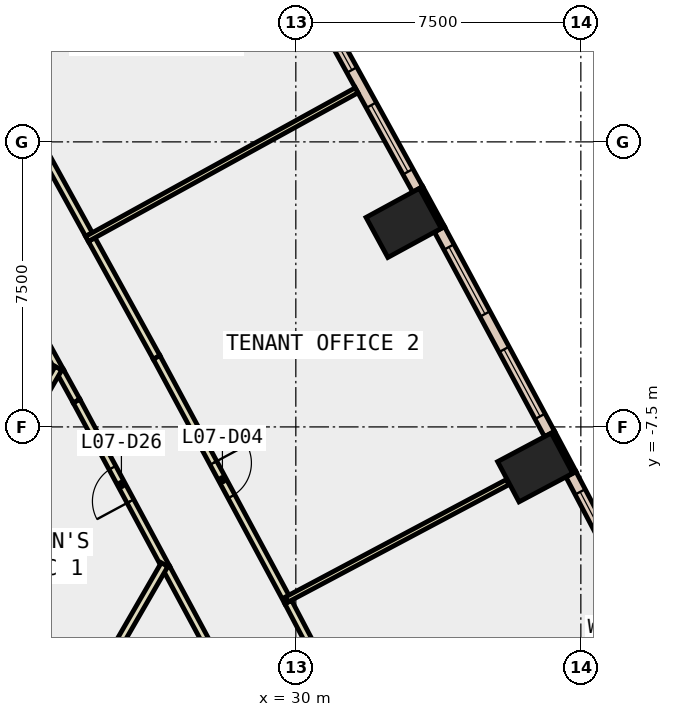
"""IFC4 building model, lengths in metres.
Left out: names, types, materials, properties, quantities, classifications, styles, units other than length and angle.
Written with IfcOpenShell. Run it as: python <this file> out.ifc"""

import sys

from ifc_helpers import new_model, si_unit, direction, frame, frame_2d, origin, origin_2d, place, context, subcontext, project, spatial, rectangle, extrude, element, fill, save


model = new_model("IFC4")
c1 = context("Model", 3, precision=1e-05, world=origin(), true_north=direction((0.0, 1.0)))
c2 = subcontext(c1, "Body", "Model", "MODEL_VIEW")
j1 = project(units=[si_unit("LENGTHUNIT", "METRE"), si_unit("PLANEANGLEUNIT", "RADIAN")], contexts=[c1])
p1 = place(None, origin())
s1 = spatial("IfcSite", under=j1, at=p1, CompositionType="ELEMENT")
p2 = place(p1, origin())
s2 = spatial("IfcBuilding", under=s1, at=p2, CompositionType="ELEMENT")
p3 = place(p2, frame((0.0, 0.0, 39.2)))
s3 = spatial("IfcBuildingStorey", under=s2, at=p3, CompositionType="ELEMENT", Elevation=39.2)
for number, where, z_axis, x_axis in (
    (1, (36.298, -8.567, -0.4), (0.0, 0.0, 1.0), (-0.469, 0.883, 0.0)),
    (2, (32.837, -2.132, -0.4), (0.0, 0.0, 1.0), (-0.478, 0.878, 0.0)),
):
    element("IfcColumn", number, at=place(p3, frame(where, z_axis=z_axis, x_axis=x_axis)), inside=s3, PredefinedType="COLUMN", context=c2, shape_type="SweptSolid", body=[
        extrude(rectangle(XDim=1.2, YDim=1.6, at=origin_2d()), origin(), (0.0, 0.0, 1.0), 4.2),
    ])
p4 = place(p3, frame((37.33, -8.698, 0.0), z_axis=(0.0, 0.0, 1.0), x_axis=(-0.469383408131, 0.882994459876, 0.0)))
e3 = element("IfcWall", 3, at=p4, inside=s3, PredefinedType="STANDARD", context=c2, shape_type="SweptSolid", body=[
    extrude(rectangle(XDim=1.199, YDim=0.1, at=frame_2d((0.6, 0.0))), origin(), (0.0, 0.0, 1.0), 3.8),
])
p5 = place(p3, frame((33.87, -2.253, 0.0), z_axis=(0.0, 0.0, 1.0), x_axis=(-0.478424520456, 0.878128679765, 0.0)))
e4 = element("IfcWall", 4, at=p5, inside=s3, PredefinedType="STANDARD", context=c2, shape_type="SweptSolid", body=[
    extrude(rectangle(XDim=1.2, YDim=0.1, at=frame_2d((0.6, 0.0))), origin(), (0.0, 0.0, 1.0), 3.8),
])
p6 = place(p3, frame((40.072, -14.141, 0.0), z_axis=(0.0, 0.0, 1.0), x_axis=(-0.464913987781, 0.885355851602, 0.0)))
e5 = element("IfcWall", 5, at=p6, inside=s3, PredefinedType="STANDARD", context=c2, shape_type="SweptSolid", body=[
    extrude(rectangle(XDim=6.094, YDim=0.3, at=frame_2d((3.047, 0.0))), origin(), (0.0, 0.0, 1.0), 3.8),
])
p7 = place(p6, frame((0.523, 0.0, 0.9)))
e6 = element("IfcOpeningElement", 6, at=p7, cuts=e5, PredefinedType="OPENING", context=c2, shape_type="SweptSolid", body=[
    extrude(rectangle(XDim=2.0, YDim=2.6, at=frame_2d((1.0, 1.3))), frame((0.0, 0.16, 0.0), z_axis=(0.0, -1.0, 0.0), x_axis=(1.0, 0.0, 0.0)), (0.0, 0.0, 1.0), 0.32),
])
p8 = place(p6, frame((3.57, 0.0, 0.9)))
e7 = element("IfcOpeningElement", 7, at=p8, cuts=e5, PredefinedType="OPENING", context=c2, shape_type="SweptSolid", body=[
    extrude(rectangle(XDim=2.0, YDim=2.6, at=frame_2d((1.0, 1.3))), frame((0.0, 0.16, 0.0), z_axis=(0.0, -1.0, 0.0), x_axis=(1.0, 0.0, 0.0)), (0.0, 0.0, 1.0), 0.32),
])
p9 = place(p3, frame((36.677, -7.688, 0.0), z_axis=(0.0, 0.0, 1.0), x_axis=(-0.47375467653, 0.880656860795, 0.0)))
e8 = element("IfcWall", 8, at=p9, inside=s3, PredefinedType="STANDARD", context=c2, shape_type="SweptSolid", body=[
    extrude(rectangle(XDim=6.117, YDim=0.3, at=frame_2d((3.059, 0.0))), origin(), (0.0, 0.0, 1.0), 3.8),
])
p10 = place(p9, frame((0.529, 0.0, 0.9)))
e9 = element("IfcOpeningElement", 9, at=p10, cuts=e8, PredefinedType="OPENING", context=c2, shape_type="SweptSolid", body=[
    extrude(rectangle(XDim=2.0, YDim=2.6, at=frame_2d((1.0, 1.3))), frame((0.0, 0.16, 0.0), z_axis=(0.0, -1.0, 0.0), x_axis=(1.0, 0.0, 0.0)), (0.0, 0.0, 1.0), 0.32),
])
p11 = place(p9, frame((3.588, 0.0, 0.9)))
e10 = element("IfcOpeningElement", 10, at=p11, cuts=e8, PredefinedType="OPENING", context=c2, shape_type="SweptSolid", body=[
    extrude(rectangle(XDim=2.0, YDim=2.6, at=frame_2d((1.0, 1.3))), frame((0.0, 0.16, 0.0), z_axis=(0.0, -1.0, 0.0), x_axis=(1.0, 0.0, 0.0)), (0.0, 0.0, 1.0), 0.32),
])
p12 = place(p3, frame((33.206, -1.249, 0.0), z_axis=(0.0, 0.0, 1.0), x_axis=(-0.482596003603, 0.875843078015, 0.0)))
e11 = element("IfcWall", 11, at=p12, inside=s3, PredefinedType="STANDARD", context=c2, shape_type="SweptSolid", body=[
    extrude(rectangle(XDim=6.115, YDim=0.3, at=frame_2d((3.058, 0.0))), origin(), (0.0, 0.0, 1.0), 3.8),
])
p13 = place(p12, frame((0.529, 0.0, 0.9)))
e12 = element("IfcOpeningElement", 12, at=p13, cuts=e11, PredefinedType="OPENING", context=c2, shape_type="SweptSolid", body=[
    extrude(rectangle(XDim=2.0, YDim=2.6, at=frame_2d((1.0, 1.3))), frame((0.0, 0.16, 0.0), z_axis=(0.0, -1.0, 0.0), x_axis=(1.0, 0.0, 0.0)), (0.0, 0.0, 1.0), 0.32),
])
p14 = place(p12, frame((3.586, 0.0, 0.9)))
e13 = element("IfcOpeningElement", 13, at=p14, cuts=e11, PredefinedType="OPENING", context=c2, shape_type="SweptSolid", body=[
    extrude(rectangle(XDim=2.0, YDim=2.6, at=frame_2d((1.0, 1.3))), frame((0.0, 0.16, 0.0), z_axis=(0.0, -1.0, 0.0), x_axis=(1.0, 0.0, 0.0)), (0.0, 0.0, 1.0), 0.32),
])
p15 = place(p3, frame((23.803, -6.044, 0.0), z_axis=(0.0, 0.0, 1.0), x_axis=(-0.482588436287, 0.875847247619, 0.0)))
e14 = element("IfcWall", 14, at=p15, inside=s3, PredefinedType="PARTITIONING", context=c2, shape_type="SweptSolid", body=[
    extrude(rectangle(XDim=6.324, YDim=0.2, at=frame_2d((3.162, 0.0))), origin(), (0.0, 0.0, 1.0), 3.8),
])
p16 = place(p15, frame((2.662, 0.0, 0.0)))
e15 = element("IfcOpeningElement", 15, at=p16, cuts=e14, PredefinedType="OPENING", context=c2, shape_type="SweptSolid", body=[
    extrude(rectangle(XDim=1.0, YDim=2.1, at=frame_2d((0.5, 1.05))), frame((0.0, 0.11, 0.0), z_axis=(0.0, -1.0, 0.0), x_axis=(1.0, 0.0, 0.0)), (0.0, 0.0, 1.0), 0.22),
])
p17 = place(p3, frame((26.592, -11.211, 0.0), z_axis=(0.0, 0.0, 1.0), x_axis=(-0.473737860011, 0.880665907136, 0.0)))
e16 = element("IfcWall", 16, at=p17, inside=s3, PredefinedType="PARTITIONING", context=c2, shape_type="SweptSolid", body=[
    extrude(rectangle(XDim=4.988, YDim=0.2, at=frame_2d((2.494, 0.0))), origin(), (0.0, 0.0, 1.0), 3.8),
])
p18 = place(p17, frame((1.994, 0.0, 0.0)))
e17 = element("IfcOpeningElement", 17, at=p18, cuts=e16, PredefinedType="OPENING", context=c2, shape_type="SweptSolid", body=[
    extrude(rectangle(XDim=1.0, YDim=2.1, at=frame_2d((0.5, 1.05))), frame((0.0, 0.11, 0.0), z_axis=(0.0, -1.0, 0.0), x_axis=(1.0, 0.0, 0.0)), (0.0, 0.0, 1.0), 0.22),
])
p19 = place(p3, frame((24.229, -6.818, 0.0), z_axis=(0.0, 0.0, 1.0), x_axis=(-0.482120251302, 0.876105052653, 0.0)))
e18 = element("IfcWall", 18, at=p19, inside=s3, PredefinedType="PARTITIONING", context=c2, shape_type="SweptSolid", body=[
    extrude(rectangle(XDim=0.884, YDim=0.2, at=frame_2d((0.442, 0.0))), origin(), (0.0, 0.0, 1.0), 3.8),
])
p20 = place(p3, frame((27.644, -13.167, 0.0), z_axis=(0.0, 0.0, 1.0), x_axis=(-0.473660574093, 0.880707477287, 0.0)))
e19 = element("IfcWall", 19, at=p20, inside=s3, PredefinedType="PARTITIONING", context=c2, shape_type="SweptSolid", body=[
    extrude(rectangle(XDim=2.221, YDim=0.2, at=frame_2d((1.11, 0.0))), origin(), (0.0, 0.0, 1.0), 3.8),
])
p21 = place(p3, frame((29.799, -12.107, 0.0), z_axis=(0.0, 0.0, 1.0), x_axis=(0.464767882002, -0.885432558617, 0.0)))
e20 = element("IfcWall", 20, at=p21, inside=s3, PredefinedType="PARTITIONING", context=c2, shape_type="SweptSolid", body=[
    extrude(rectangle(XDim=6.233, YDim=0.2, at=frame_2d((3.117, 0.0))), origin(), (0.0, 0.0, 1.0), 3.8),
])
p22 = place(p21, frame((2.58, 0.0, 0.0)))
e21 = element("IfcOpeningElement", 21, at=p22, cuts=e20, PredefinedType="OPENING", context=c2, shape_type="SweptSolid", body=[
    extrude(rectangle(XDim=1.0, YDim=2.1, at=frame_2d((0.5, 1.05))), frame((0.0, 0.11, 0.0), z_axis=(0.0, -1.0, 0.0), x_axis=(1.0, 0.0, 0.0)), (0.0, 0.0, 1.0), 0.22),
])
p23 = place(p3, frame((24.628, -2.569, 0.0), z_axis=(0.0, 0.0, 1.0), x_axis=(0.482566980384, -0.875859069396, 0.0)))
e22 = element("IfcWall", 22, at=p23, inside=s3, PredefinedType="PARTITIONING", context=c2, shape_type="SweptSolid", body=[
    extrude(rectangle(XDim=3.542, YDim=0.2, at=frame_2d((1.771, 0.0))), origin(), (0.0, 0.0, 1.0), 3.8),
])
p24 = place(p3, frame((26.337, -5.671, 0.0), z_axis=(0.0, 0.0, 1.0), x_axis=(0.473794961698, -0.880635187958, 0.0)))
e23 = element("IfcWall", 23, at=p24, inside=s3, PredefinedType="PARTITIONING", context=c2, shape_type="SweptSolid", body=[
    extrude(rectangle(XDim=7.307, YDim=0.2, at=frame_2d((3.654, 0.0))), origin(), (0.0, 0.0, 1.0), 3.8),
])
p25 = place(p24, frame((3.154, 0.0, 0.0)))
e24 = element("IfcOpeningElement", 24, at=p25, cuts=e23, PredefinedType="OPENING", context=c2, shape_type="SweptSolid", body=[
    extrude(rectangle(XDim=1.0, YDim=2.1, at=frame_2d((0.5, 1.05))), frame((0.0, 0.11, 0.0), z_axis=(0.0, -1.0, 0.0), x_axis=(1.0, 0.0, 0.0)), (0.0, 0.0, 1.0), 0.22),
])
p26 = place(p3, frame((22.847, 0.664, 0.0), z_axis=(0.0, 0.0, 1.0), x_axis=(0.482537844436, -0.875875121628, 0.0)))
e25 = element("IfcWall", 25, at=p26, inside=s3, PredefinedType="PARTITIONING", context=c2, shape_type="SweptSolid", body=[
    extrude(rectangle(XDim=3.542, YDim=0.2, at=frame_2d((1.771, 0.0))), origin(), (0.0, 0.0, 1.0), 3.8),
])
p27 = place(p3, frame((23.754, -5.956, 0.0), z_axis=(0.0, 0.0, 1.0), x_axis=(-0.500093796661, -0.865971243484, 0.0)))
e26 = element("IfcWall", 26, at=p27, inside=s3, PredefinedType="PARTITIONING", context=c2, shape_type="SweptSolid", body=[
    extrude(rectangle(XDim=1.594, YDim=0.2, at=frame_2d((0.797, 0.0))), origin(), (0.0, 0.0, 1.0), 3.8),
])
p28 = place(p3, frame((20.482, -11.824, 0.0), z_axis=(0.0, 0.0, 1.0), x_axis=(0.866022959057, -0.500004234368, 0.0)))
e27 = element("IfcWall", 27, at=p28, inside=s3, PredefinedType="PARTITIONING", context=c2, shape_type="SweptSolid", body=[
    extrude(rectangle(XDim=5.0, YDim=0.2, at=frame_2d((2.5, 0.0))), origin(), (0.0, 0.0, 1.0), 3.8),
])
p29 = place(p3, frame((26.545, -11.123, 0.0), z_axis=(0.0, 0.0, 1.0), x_axis=(-0.500100605862, -0.865967311171, 0.0)))
e28 = element("IfcWall", 28, at=p29, inside=s3, PredefinedType="PARTITIONING", context=c2, shape_type="SweptSolid", body=[
    extrude(rectangle(XDim=3.539, YDim=0.2, at=frame_2d((1.77, 0.0))), origin(), (0.0, 0.0, 1.0), 3.8),
])
p30 = place(p3, frame((29.764, -12.04, 0.0), z_axis=(0.0, 0.0, 1.0), x_axis=(0.883018657393, 0.469337885426, 0.0)))
e29 = element("IfcWall", 29, at=p30, inside=s3, PredefinedType="PARTITIONING", context=c2, shape_type="SweptSolid", body=[
    extrude(rectangle(XDim=6.58, YDim=0.15, at=frame_2d((3.29, 0.0))), origin(), (0.0, 0.0, 1.0), 3.8),
])
p31 = place(p3, frame((24.505, -2.552, 0.0), z_axis=(0.0, 0.0, 1.0), x_axis=(0.875845276652, 0.482592013369, 0.0)))
e30 = element("IfcWall", 30, at=p31, inside=s3, PredefinedType="PARTITIONING", context=c2, shape_type="SweptSolid", body=[
    extrude(rectangle(XDim=8.1, YDim=0.15, at=frame_2d((4.05, 0.0))), origin(), (0.0, 0.0, 1.0), 3.8),
])
p32 = place(p8, origin())
e31 = element("IfcWindow", 31, at=p32, inside=s3, PartitioningType="SINGLE_PANEL", PredefinedType="WINDOW", context=c2, shape_type="SweptSolid", body=[
    extrude(rectangle(XDim=2.0, YDim=2.6, at=frame_2d((1.0, 1.3))), frame((0.0, 0.03, 0.0), z_axis=(0.0, -1.0, 0.0), x_axis=(1.0, 0.0, 0.0)), (0.0, 0.0, 1.0), 0.06),
])
fill(e7, e31)
p33 = place(p10, origin())
e32 = element("IfcWindow", 32, at=p33, inside=s3, PartitioningType="SINGLE_PANEL", PredefinedType="WINDOW", context=c2, shape_type="SweptSolid", body=[
    extrude(rectangle(XDim=2.0, YDim=2.6, at=frame_2d((1.0, 1.3))), frame((0.0, 0.03, 0.0), z_axis=(0.0, -1.0, 0.0), x_axis=(1.0, 0.0, 0.0)), (0.0, 0.0, 1.0), 0.06),
])
fill(e9, e32)
p34 = place(p11, origin())
e33 = element("IfcWindow", 33, at=p34, inside=s3, PartitioningType="SINGLE_PANEL", PredefinedType="WINDOW", context=c2, shape_type="SweptSolid", body=[
    extrude(rectangle(XDim=2.0, YDim=2.6, at=frame_2d((1.0, 1.3))), frame((0.0, 0.03, 0.0), z_axis=(0.0, -1.0, 0.0), x_axis=(1.0, 0.0, 0.0)), (0.0, 0.0, 1.0), 0.06),
])
fill(e10, e33)
p35 = place(p13, origin())
e34 = element("IfcWindow", 34, at=p35, inside=s3, PartitioningType="SINGLE_PANEL", PredefinedType="WINDOW", context=c2, shape_type="SweptSolid", body=[
    extrude(rectangle(XDim=2.0, YDim=2.6, at=frame_2d((1.0, 1.3))), frame((0.0, 0.03, 0.0), z_axis=(0.0, -1.0, 0.0), x_axis=(1.0, 0.0, 0.0)), (0.0, 0.0, 1.0), 0.06),
])
fill(e12, e34)
p36 = place(p14, origin())
e35 = element("IfcWindow", 35, at=p36, inside=s3, PartitioningType="SINGLE_PANEL", PredefinedType="WINDOW", context=c2, shape_type="SweptSolid", body=[
    extrude(rectangle(XDim=2.0, YDim=2.6, at=frame_2d((1.0, 1.3))), frame((0.0, 0.03, 0.0), z_axis=(0.0, -1.0, 0.0), x_axis=(1.0, 0.0, 0.0)), (0.0, 0.0, 1.0), 0.06),
])
fill(e13, e35)
p37 = place(p25, origin())
e36 = element("IfcDoor", 36, at=p37, inside=s3, OperationType="SINGLE_SWING_LEFT", PredefinedType="DOOR", context=c2, shape_type="SweptSolid", body=[
    extrude(rectangle(XDim=1.0, YDim=2.1, at=frame_2d((0.5, 1.05))), frame((0.0, 0.025, 0.0), z_axis=(0.0, -1.0, 0.0), x_axis=(1.0, 0.0, 0.0)), (0.0, 0.0, 1.0), 0.05),
])
fill(e24, e36)
p38 = place(p18, origin())
e37 = element("IfcDoor", 37, at=p38, inside=s3, OperationType="SINGLE_SWING_LEFT", PredefinedType="DOOR", context=c2, shape_type="SweptSolid", body=[
    extrude(rectangle(XDim=1.0, YDim=2.1, at=frame_2d((0.5, 1.05))), frame((0.0, 0.025, 0.0), z_axis=(0.0, -1.0, 0.0), x_axis=(1.0, 0.0, 0.0)), (0.0, 0.0, 1.0), 0.05),
])
fill(e17, e37)
save(model, sys.argv[1])
